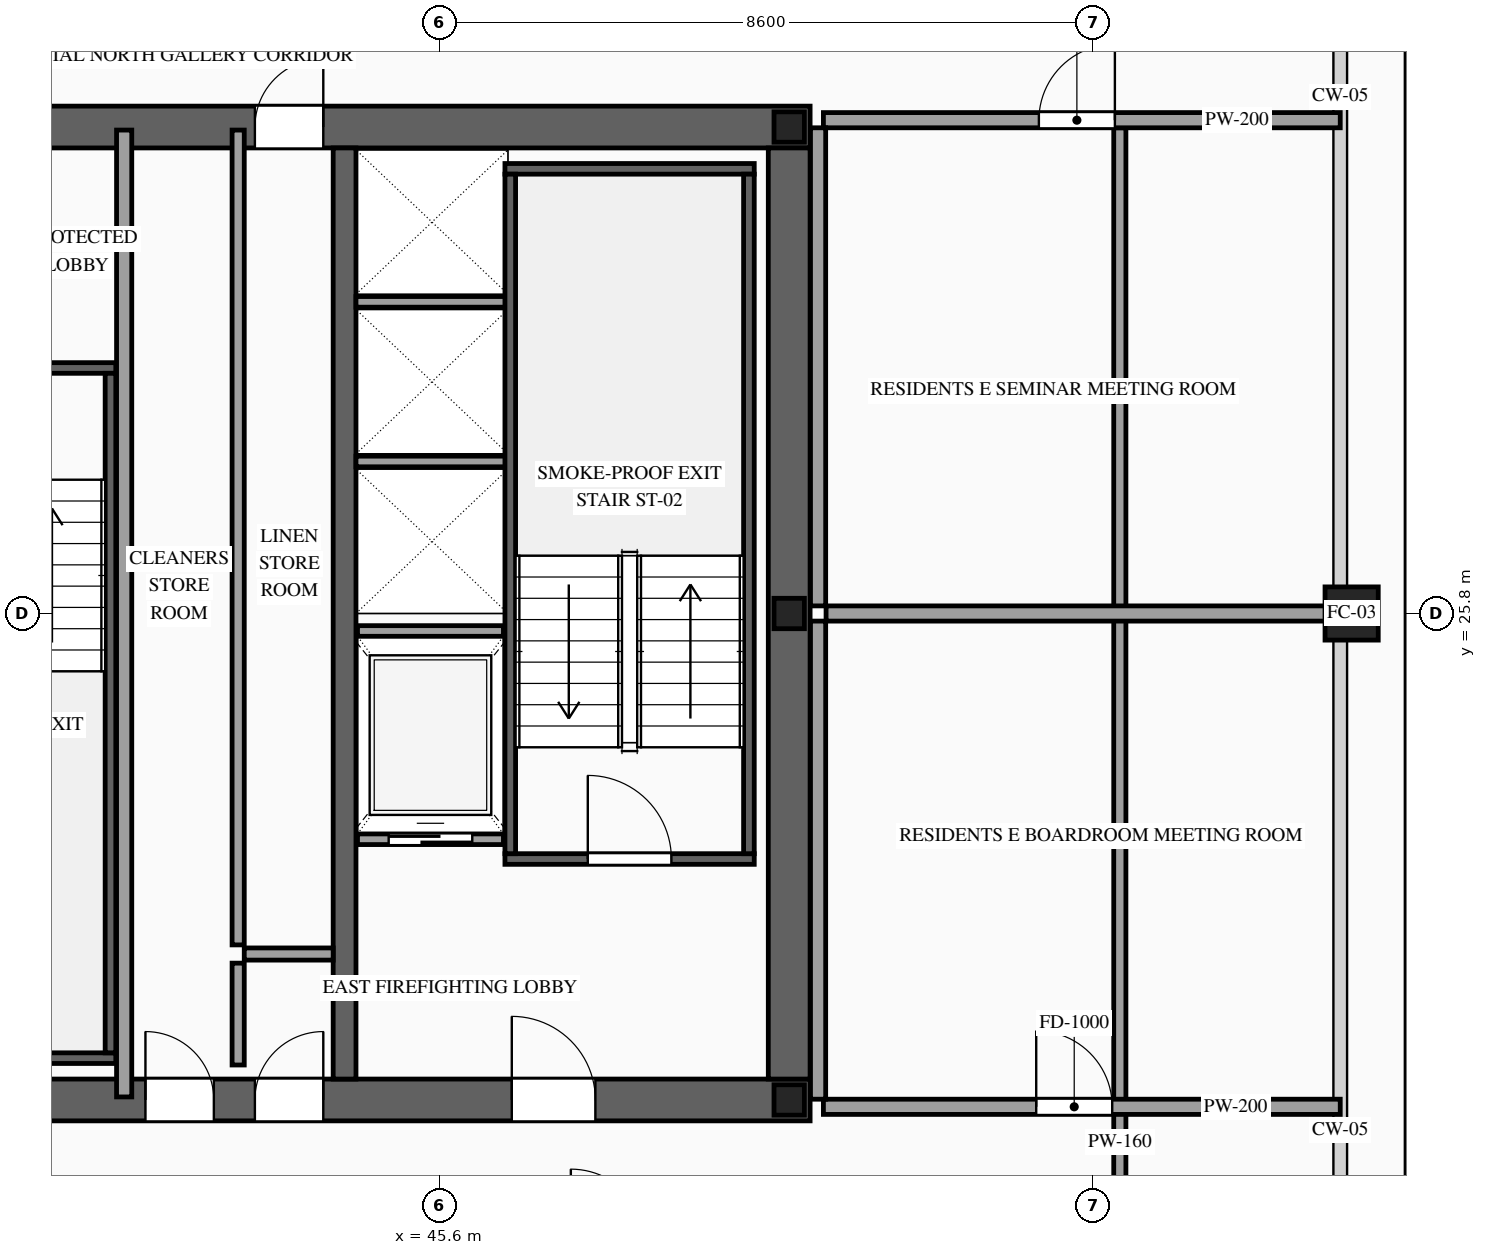
"""IFC4 building model, lengths in metres.
Left out: names, types, materials, properties, quantities, classifications, styles, units other than length and angle.
Written with IfcOpenShell. Run it as: python <this file> out.ifc"""

import sys

from ifc_helpers import new_model, si_unit, direction, frame, frame_2d, origin, origin_2d, place, context, subcontext, project, spatial, rectangle, hollow_rectangle, i_section, extrude, source, transform, mapped, element, fill, save


model = new_model("IFC4")
c1 = context("Model", 3, precision=1e-05, world=origin(), true_north=direction((0.0, 1.0)))
c2 = subcontext(c1, "Body", "Model", "MODEL_VIEW")
j1 = project(units=[si_unit("LENGTHUNIT", "METRE"), si_unit("PLANEANGLEUNIT", "RADIAN")], contexts=[c1])
p1 = place(None, origin())
s1 = spatial("IfcSite", under=j1, at=p1, CompositionType="ELEMENT")
p2 = place(p1, origin())
s2 = spatial("IfcBuilding", under=s1, at=p2, CompositionType="ELEMENT")
p3 = place(p2, frame((0.0, 0.0, 227.6)))
s3 = spatial("IfcBuildingStorey", under=s2, at=p3, CompositionType="ELEMENT", Elevation=227.6)
p4 = place(p3, frame((23.525, 19.4, 0.0), z_axis=(0.0, 0.0, 1.0), x_axis=(1.0, 0.0, 0.0)))
e1 = element("IfcWall", 1, at=p4, inside=s3, PredefinedType="SHEAR", context=c2, shape_type="SweptSolid", body=[
    extrude(rectangle(XDim=26.95, YDim=0.55, at=frame_2d((13.475, 0.0))), origin(), (0.0, 0.0, 1.0), 3.5),
])
p5 = place(p4, frame((1.925, 0.0, 0.0)))
e2 = element("IfcOpeningElement", 2, at=p5, cuts=e1, PredefinedType="OPENING", context=c2, shape_type="SweptSolid", body=[
    extrude(rectangle(XDim=1.1, YDim=2.2, at=frame_2d((0.55, 1.1))), frame((0.0, 0.29, 0.0), z_axis=(0.0, -1.0, 0.0), x_axis=(1.0, 0.0, 0.0)), (0.0, 0.0, 1.0), 0.58),
])
p6 = place(p4, frame((9.825, 0.0, 0.0)))
e3 = element("IfcOpeningElement", 3, at=p6, cuts=e1, PredefinedType="OPENING", context=c2, shape_type="SweptSolid", body=[
    extrude(rectangle(XDim=1.1, YDim=2.2, at=frame_2d((0.55, 1.1))), frame((0.0, 0.29, 0.0), z_axis=(0.0, -1.0, 0.0), x_axis=(1.0, 0.0, 0.0)), (0.0, 0.0, 1.0), 0.58),
])
p7 = place(p4, frame((23.025, 0.0, 0.0)))
e4 = element("IfcOpeningElement", 4, at=p7, cuts=e1, PredefinedType="OPENING", context=c2, shape_type="SweptSolid", body=[
    extrude(rectangle(XDim=1.1, YDim=2.2, at=frame_2d((0.55, 1.1))), frame((0.0, 0.29, 0.0), z_axis=(0.0, -1.0, 0.0), x_axis=(1.0, 0.0, 0.0)), (0.0, 0.0, 1.0), 0.58),
])
p8 = place(p4, frame((19.645, 0.0, 0.0)))
e5 = element("IfcOpeningElement", 5, at=p8, cuts=e1, PredefinedType="OPENING", context=c2, shape_type="SweptSolid", body=[
    extrude(rectangle(XDim=0.9, YDim=2.15, at=frame_2d((0.45, 1.075))), frame((0.0, 0.29, 0.0), z_axis=(0.0, -1.0, 0.0), x_axis=(1.0, 0.0, 0.0)), (0.0, 0.0, 1.0), 0.58),
])
p9 = place(p4, frame((18.205, 0.0, 0.0)))
e6 = element("IfcOpeningElement", 6, at=p9, cuts=e1, PredefinedType="OPENING", context=c2, shape_type="SweptSolid", body=[
    extrude(rectangle(XDim=0.9, YDim=2.15, at=frame_2d((0.45, 1.075))), frame((0.0, 0.29, 0.0), z_axis=(0.0, -1.0, 0.0), x_axis=(1.0, 0.0, 0.0)), (0.0, 0.0, 1.0), 0.58),
])
p10 = place(p3, frame((23.525, 32.2, 0.0), z_axis=(0.0, 0.0, 1.0), x_axis=(1.0, 0.0, 0.0)))
e7 = element("IfcWall", 7, at=p10, inside=s3, PredefinedType="SHEAR", context=c2, shape_type="SweptSolid", body=[
    extrude(rectangle(XDim=26.95, YDim=0.55, at=frame_2d((13.475, 0.0))), origin(), (0.0, 0.0, 1.0), 3.5),
])
p11 = place(p10, frame((4.545, 0.0, 0.0)))
e8 = element("IfcOpeningElement", 8, at=p11, cuts=e7, PredefinedType="OPENING", context=c2, shape_type="SweptSolid", body=[
    extrude(rectangle(XDim=0.9, YDim=2.15, at=frame_2d((0.45, 1.075))), frame((0.0, 0.29, 0.0), z_axis=(0.0, -1.0, 0.0), x_axis=(1.0, 0.0, 0.0)), (0.0, 0.0, 1.0), 0.58),
])
p12 = place(p10, frame((9.825, 0.0, 0.0)))
e9 = element("IfcOpeningElement", 9, at=p12, cuts=e7, PredefinedType="OPENING", context=c2, shape_type="SweptSolid", body=[
    extrude(rectangle(XDim=1.1, YDim=2.2, at=frame_2d((0.55, 1.1))), frame((0.0, 0.29, 0.0), z_axis=(0.0, -1.0, 0.0), x_axis=(1.0, 0.0, 0.0)), (0.0, 0.0, 1.0), 0.58),
])
p13 = place(p10, frame((15.675, 0.0, 0.0)))
e10 = element("IfcOpeningElement", 10, at=p13, cuts=e7, PredefinedType="OPENING", context=c2, shape_type="SweptSolid", body=[
    extrude(rectangle(XDim=1.1, YDim=2.2, at=frame_2d((0.55, 1.1))), frame((0.0, 0.29, 0.0), z_axis=(0.0, -1.0, 0.0), x_axis=(1.0, 0.0, 0.0)), (0.0, 0.0, 1.0), 0.58),
])
p14 = place(p10, frame((19.645, 0.0, 0.0)))
e11 = element("IfcOpeningElement", 11, at=p14, cuts=e7, PredefinedType="OPENING", context=c2, shape_type="SweptSolid", body=[
    extrude(rectangle(XDim=0.9, YDim=2.15, at=frame_2d((0.45, 1.075))), frame((0.0, 0.29, 0.0), z_axis=(0.0, -1.0, 0.0), x_axis=(1.0, 0.0, 0.0)), (0.0, 0.0, 1.0), 0.58),
])
m1 = source(origin(), c2, "Body", "SweptSolid", [
    extrude(rectangle(XDim=12.25, YDim=0.55, at=frame_2d((6.125, 0.0))), origin(), (0.0, 0.0, 1.0), 3.5),
])
p15 = place(p3, frame((50.2, 19.675, 0.0), z_axis=(0.0, 0.0, 1.0), x_axis=(0.0, 1.0, 0.0)))
e12 = element("IfcWall", 12, at=p15, inside=s3, PredefinedType="SHEAR", context=c2, shape_type="MappedRepresentation", body=[
    mapped(m1, transform((0.0, 0.0, 0.0), scale=1.0)),
])
m2 = source(origin(), c2, "Body", "SweptSolid", [
    extrude(rectangle(XDim=12.25, YDim=0.3, at=frame_2d((6.125, 0.0))), origin(), (0.0, 0.0, 1.0), 3.5),
])
p16 = place(p3, frame((44.35, 19.675, 0.0), z_axis=(0.0, 0.0, 1.0), x_axis=(0.0, 1.0, 0.0)))
e13 = element("IfcWall", 13, at=p16, inside=s3, PredefinedType="SOLIDWALL", context=c2, shape_type="MappedRepresentation", body=[
    mapped(m2, transform((0.0, 0.0, 0.0), scale=1.0)),
])
m3 = source(origin(), c2, "Body", "SweptSolid", [
    extrude(i_section(OverallWidth=0.4, OverallDepth=0.4, WebThickness=0.013, FlangeThickness=0.021, at=origin_2d()), origin(), (0.0, 0.0, 1.0), 3.5),
])
for number, where, z_axis, x_axis in (
    (14, (50.2, 19.4, 0.0), (0.0, 0.0, 1.0), (1.0, 0.0, 0.0)),
    (15, (50.2, 25.8, 0.0), (0.0, 0.0, 1.0), (1.0, 0.0, 0.0)),
    (16, (50.2, 32.2, 0.0), (0.0, 0.0, 1.0), (1.0, 0.0, 0.0)),
):
    element("IfcColumn", number, at=place(p3, frame(where, z_axis=z_axis, x_axis=x_axis)), inside=s3, PredefinedType="COLUMN", context=c2, shape_type="MappedRepresentation", body=[
        mapped(m3, transform((0.0, 0.0, 0.0), scale=1.0)),
    ])
m4 = source(origin(), c2, "Body", "SweptSolid", [
    extrude(hollow_rectangle(XDim=0.7, YDim=0.7, WallThickness=0.032, at=origin_2d()), origin(), (0.0, 0.0, 1.0), 3.5),
])
p17 = place(p3, frame((57.6, 25.8, 0.0), z_axis=(0.0, 0.0, 1.0), x_axis=(1.0, 0.0, 0.0)))
e17 = element("IfcColumn", 17, at=p17, inside=s3, PredefinedType="COLUMN", context=c2, shape_type="MappedRepresentation", body=[
    mapped(m4, transform((0.0, 0.0, 0.0), scale=1.0)),
])
p18 = place(p3, frame((44.52, 22.83, 0.0), z_axis=(0.0, 0.0, 1.0), x_axis=(1.0, 0.0, 0.0)))
e18 = element("IfcWall", 18, at=p18, inside=s3, PredefinedType="SOLIDWALL", context=c2, shape_type="SweptSolid", body=[
    extrude(rectangle(XDim=1.92, YDim=0.14, at=frame_2d((0.96, 0.0))), origin(), (0.0, 0.0, 1.0), 3.28),
])
p19 = place(p18, frame((0.41, 0.0, 0.0)))
e19 = element("IfcOpeningElement", 19, at=p19, cuts=e18, PredefinedType="OPENING", context=c2, shape_type="SweptSolid", body=[
    extrude(rectangle(XDim=1.1, YDim=2.2, at=frame_2d((0.55, 1.1))), frame((0.0, 0.085, 0.0), z_axis=(0.0, -1.0, 0.0), x_axis=(1.0, 0.0, 0.0)), (0.0, 0.0, 1.0), 0.17),
])
m5 = source(origin(), c2, "Body", "SweptSolid", [
    extrude(rectangle(XDim=1.92, YDim=0.14, at=frame_2d((0.96, 0.0))), origin(), (0.0, 0.0, 1.0), 3.28),
])
p20 = place(p3, frame((44.52, 25.57, 0.0), z_axis=(0.0, 0.0, 1.0), x_axis=(1.0, 0.0, 0.0)))
e20 = element("IfcWall", 20, at=p20, inside=s3, PredefinedType="SOLIDWALL", context=c2, shape_type="MappedRepresentation", body=[
    mapped(m5, transform((0.0, 0.0, 0.0), scale=1.0)),
])
m6 = source(origin(), c2, "Body", "SweptSolid", [
    extrude(rectangle(XDim=2.0, YDim=0.14, at=frame_2d((1.0, 0.0))), origin(), (0.0, 0.0, 1.0), 3.28),
])
for number, where, z_axis, x_axis in (
    (21, (44.5, 27.8, 0.0), (0.0, 0.0, 1.0), (1.0, 0.0, 0.0)),
    (22, (44.5, 29.9, 0.0), (0.0, 0.0, 1.0), (1.0, 0.0, 0.0)),
):
    element("IfcWall", number, at=place(p3, frame(where, z_axis=z_axis, x_axis=x_axis)), inside=s3, PredefinedType="SOLIDWALL", context=c2, shape_type="MappedRepresentation", body=[
        mapped(m6, transform((0.0, 0.0, 0.0), scale=1.0)),
    ])
p21 = place(p3, frame((46.46, 22.57, 0.0), z_axis=(0.0, 0.0, 1.0), x_axis=(1.0, 0.0, 0.0)))
e23 = element("IfcWall", 23, at=p21, inside=s3, PredefinedType="SOLIDWALL", context=c2, shape_type="SweptSolid", body=[
    extrude(rectangle(XDim=3.28, YDim=0.14, at=frame_2d((1.64, 0.0))), origin(), (0.0, 0.0, 1.0), 3.28),
])
p22 = place(p21, frame((1.09, 0.0, 0.0)))
e24 = element("IfcOpeningElement", 24, at=p22, cuts=e23, PredefinedType="OPENING", context=c2, shape_type="SweptSolid", body=[
    extrude(rectangle(XDim=1.1, YDim=2.2, at=frame_2d((0.55, 1.1))), frame((0.0, 0.085, 0.0), z_axis=(0.0, -1.0, 0.0), x_axis=(1.0, 0.0, 0.0)), (0.0, 0.0, 1.0), 0.17),
])
m7 = source(origin(), c2, "Body", "SweptSolid", [
    extrude(rectangle(XDim=3.28, YDim=0.14, at=frame_2d((1.64, 0.0))), origin(), (0.0, 0.0, 1.0), 3.28),
])
p23 = place(p3, frame((46.46, 31.65, 0.0), z_axis=(0.0, 0.0, 1.0), x_axis=(1.0, 0.0, 0.0)))
e25 = element("IfcWall", 25, at=p23, inside=s3, PredefinedType="SOLIDWALL", context=c2, shape_type="MappedRepresentation", body=[
    mapped(m7, transform((0.0, 0.0, 0.0), scale=1.0)),
])
m8 = source(origin(), c2, "Body", "SweptSolid", [
    extrude(rectangle(XDim=8.94, YDim=0.14, at=frame_2d((4.47, 0.0))), origin(), (0.0, 0.0, 1.0), 3.28),
])
for number, where, z_axis, x_axis in (
    (26, (46.53, 22.64, 0.0), (0.0, 0.0, 1.0), (0.0, 1.0, 0.0)),
    (27, (49.67, 22.64, 0.0), (0.0, 0.0, 1.0), (0.0, 1.0, 0.0)),
):
    element("IfcWall", number, at=place(p3, frame(where, z_axis=z_axis, x_axis=x_axis)), inside=s3, PredefinedType="SOLIDWALL", context=c2, shape_type="MappedRepresentation", body=[
        mapped(m8, transform((0.0, 0.0, 0.0), scale=1.0)),
    ])
p24 = place(p3, frame((38.2, 29.03, 0.0), z_axis=(0.0, 0.0, 1.0), x_axis=(1.0, 0.0, 0.0)))
e28 = element("IfcWall", 28, at=p24, inside=s3, PredefinedType="SOLIDWALL", context=c2, shape_type="SweptSolid", body=[
    extrude(rectangle(XDim=3.14, YDim=0.14, at=frame_2d((1.57, 0.0))), origin(), (0.0, 0.0, 1.0), 3.28),
])
p25 = place(p24, frame((1.02, 0.0, 0.0)))
e29 = element("IfcOpeningElement", 29, at=p25, cuts=e28, PredefinedType="OPENING", context=c2, shape_type="SweptSolid", body=[
    extrude(rectangle(XDim=1.1, YDim=2.2, at=frame_2d((0.55, 1.1))), frame((0.0, 0.085, 0.0), z_axis=(0.0, -1.0, 0.0), x_axis=(1.0, 0.0, 0.0)), (0.0, 0.0, 1.0), 0.17),
])
m9 = source(origin(), c2, "Body", "SweptSolid", [
    extrude(rectangle(XDim=3.14, YDim=0.14, at=frame_2d((1.57, 0.0))), origin(), (0.0, 0.0, 1.0), 3.28),
])
p26 = place(p3, frame((38.2, 19.95, 0.0), z_axis=(0.0, 0.0, 1.0), x_axis=(1.0, 0.0, 0.0)))
e30 = element("IfcWall", 30, at=p26, inside=s3, PredefinedType="SOLIDWALL", context=c2, shape_type="MappedRepresentation", body=[
    mapped(m9, transform((0.0, 0.0, 0.0), scale=1.0)),
])
m10 = source(origin(), c2, "Body", "SweptSolid", [
    extrude(rectangle(XDim=8.94, YDim=0.14, at=frame_2d((4.47, 0.0))), origin(), (0.0, 0.0, 1.0), 3.28),
])
p27 = place(p3, frame((41.27, 20.02, 0.0), z_axis=(0.0, 0.0, 1.0), x_axis=(0.0, 1.0, 0.0)))
e31 = element("IfcWall", 31, at=p27, inside=s3, PredefinedType="SOLIDWALL", context=c2, shape_type="MappedRepresentation", body=[
    mapped(m10, transform((0.0, 0.0, 0.0), scale=1.0)),
])
m11 = source(origin(), c2, "Body", "SweptSolid", [
    extrude(rectangle(XDim=1.34, YDim=0.16, at=frame_2d((0.67, 0.0))), origin(), (0.0, 0.0, 1.0), 3.28),
])
p28 = place(p3, frame((42.95, 19.86, 0.0), z_axis=(0.0, 0.0, 1.0), x_axis=(0.0, 1.0, 0.0)))
e32 = element("IfcWall", 32, at=p28, inside=s3, PredefinedType="PARTITIONING", context=c2, shape_type="MappedRepresentation", body=[
    mapped(m11, transform((0.0, 0.0, 0.0), scale=1.0)),
])
m12 = source(origin(), c2, "Body", "SweptSolid", [
    extrude(rectangle(XDim=1.17, YDim=0.16, at=frame_2d((0.585, 0.0))), origin(), (0.0, 0.0, 1.0), 3.28),
])
p29 = place(p3, frame((43.03, 21.32, 0.0), z_axis=(0.0, 0.0, 1.0), x_axis=(1.0, 0.0, 0.0)))
e33 = element("IfcWall", 33, at=p29, inside=s3, PredefinedType="PARTITIONING", context=c2, shape_type="MappedRepresentation", body=[
    mapped(m12, transform((0.0, 0.0, 0.0), scale=1.0)),
])
m13 = source(origin(), c2, "Body", "SweptSolid", [
    extrude(rectangle(XDim=12.72, YDim=0.2, at=frame_2d((6.36, 0.0))), origin(), (0.0, 0.0, 1.0), 3.28),
])
p30 = place(p3, frame((41.45, 19.44, 0.0), z_axis=(0.0, 0.0, 1.0), x_axis=(0.0, 1.0, 0.0)))
e34 = element("IfcWall", 34, at=p30, inside=s3, PredefinedType="PARTITIONING", context=c2, shape_type="MappedRepresentation", body=[
    mapped(m13, transform((0.0, 0.0, 0.0), scale=1.0)),
])
m14 = source(origin(), c2, "Body", "SweptSolid", [
    extrude(rectangle(XDim=10.72, YDim=0.16, at=frame_2d((5.36, 0.0))), origin(), (0.0, 0.0, 1.0), 3.28),
])
p31 = place(p3, frame((42.95, 21.44, 0.0), z_axis=(0.0, 0.0, 1.0), x_axis=(0.0, 1.0, 0.0)))
e35 = element("IfcWall", 35, at=p31, inside=s3, PredefinedType="PARTITIONING", context=c2, shape_type="MappedRepresentation", body=[
    mapped(m14, transform((0.0, 0.0, 0.0), scale=1.0)),
])
m15 = source(origin(), c2, "Body", "SweptSolid", [
    extrude(rectangle(XDim=26.69, YDim=0.16, at=frame_2d((13.345, 0.0))), origin(), (0.0, 0.0, 1.0), 3.28),
])
p32 = place(p3, frame((54.55, 5.5, 0.0), z_axis=(0.0, 0.0, 1.0), x_axis=(0.0, 1.0, 0.0)))
e36 = element("IfcWall", 36, at=p32, inside=s3, PredefinedType="PARTITIONING", context=c2, shape_type="MappedRepresentation", body=[
    mapped(m15, transform((0.0, 0.0, 0.0), scale=1.0)),
])
p33 = place(p3, frame((50.65, 19.31, 0.0), z_axis=(0.0, 0.0, 1.0), x_axis=(1.0, 0.0, 0.0)))
e37 = element("IfcWall", 37, at=p33, inside=s3, PredefinedType="PARTITIONING", context=c2, shape_type="SweptSolid", body=[
    extrude(rectangle(XDim=6.8, YDim=0.2, at=frame_2d((3.4, 0.0))), origin(), (0.0, 0.0, 1.0), 2.825),
])
p34 = place(p33, frame((2.8, 0.0, 0.0)))
e38 = element("IfcOpeningElement", 38, at=p34, cuts=e37, PredefinedType="OPENING", context=c2, shape_type="SweptSolid", body=[
    extrude(rectangle(XDim=1.0, YDim=2.2, at=frame_2d((0.5, 1.1))), frame((0.0, 0.115, 0.0), z_axis=(0.0, -1.0, 0.0), x_axis=(1.0, 0.0, 0.0)), (0.0, 0.0, 1.0), 0.23),
])
m16 = source(origin(), c2, "Body", "SweptSolid", [
    extrude(rectangle(XDim=6.765, YDim=0.2, at=frame_2d((3.382, 0.0))), origin(), (0.0, 0.0, 1.0), 2.787),
])
p35 = place(p3, frame((50.685, 25.8, 0.0), z_axis=(0.0, 0.0, 1.0), x_axis=(1.0, 0.0, 0.0)))
e39 = element("IfcWall", 39, at=p35, inside=s3, PredefinedType="PARTITIONING", context=c2, shape_type="MappedRepresentation", body=[
    mapped(m16, transform((0.0, 0.0, 0.0), scale=1.0)),
])
m17 = source(origin(), c2, "Body", "SweptSolid", [
    extrude(rectangle(XDim=6.29, YDim=0.2, at=frame_2d((3.145, 0.0))), origin(), (0.0, 0.0, 1.0), 3.28),
])
p36 = place(p3, frame((50.58, 19.41, 0.0), z_axis=(0.0, 0.0, 1.0), x_axis=(0.0, 1.0, 0.0)))
e40 = element("IfcWall", 40, at=p36, inside=s3, PredefinedType="PARTITIONING", context=c2, shape_type="MappedRepresentation", body=[
    mapped(m17, transform((0.0, 0.0, 0.0), scale=1.0)),
])
p37 = place(p3, frame((50.65, 32.29, 0.0), z_axis=(0.0, 0.0, 1.0), x_axis=(1.0, 0.0, 0.0)))
e41 = element("IfcWall", 41, at=p37, inside=s3, PredefinedType="PARTITIONING", context=c2, shape_type="SweptSolid", body=[
    extrude(rectangle(XDim=6.8, YDim=0.2, at=frame_2d((3.4, 0.0))), origin(), (0.0, 0.0, 1.0), 2.825),
])
p38 = place(p37, frame((2.835, 0.0, 0.0)))
e42 = element("IfcOpeningElement", 42, at=p38, cuts=e41, PredefinedType="OPENING", context=c2, shape_type="SweptSolid", body=[
    extrude(rectangle(XDim=1.0, YDim=2.2, at=frame_2d((0.5, 1.1))), frame((0.0, 0.115, 0.0), z_axis=(0.0, -1.0, 0.0), x_axis=(1.0, 0.0, 0.0)), (0.0, 0.0, 1.0), 0.23),
])
p39 = place(p3, frame((50.58, 25.9, 0.0), z_axis=(0.0, 0.0, 1.0), x_axis=(0.0, 1.0, 0.0)))
e43 = element("IfcWall", 43, at=p39, inside=s3, PredefinedType="PARTITIONING", context=c2, shape_type="MappedRepresentation", body=[
    mapped(m17, transform((0.0, 0.0, 0.0), scale=1.0)),
])
m18 = source(origin(), c2, "Body", "SweptSolid", [
    extrude(rectangle(XDim=1.1, YDim=2.2, at=frame_2d((0.55, 1.1))), frame((0.0, 0.025, 0.0), z_axis=(0.0, -1.0, 0.0), x_axis=(1.0, 0.0, 0.0)), (0.0, 0.0, 1.0), 0.05),
])
p40 = place(p19, origin())
e44 = element("IfcDoor", 44, at=p40, inside=s3, OperationType="SLIDING_TO_RIGHT", PredefinedType="DOOR", context=c2, shape_type="MappedRepresentation", body=[
    mapped(m18, transform((0.0, 0.0, 0.0), scale=1.0)),
])
fill(e19, e44)
m19 = source(origin(), c2, "Body", "SweptSolid", [
    extrude(rectangle(XDim=1.1, YDim=2.2, at=frame_2d((0.55, 1.1))), frame((0.0, 0.025, 0.0), z_axis=(0.0, -1.0, 0.0), x_axis=(1.0, 0.0, 0.0)), (0.0, 0.0, 1.0), 0.05),
])
p41 = place(p22, origin())
e45 = element("IfcDoor", 45, at=p41, inside=s3, OperationType="SINGLE_SWING_LEFT", PredefinedType="DOOR", context=c2, shape_type="MappedRepresentation", body=[
    mapped(m19, transform((0.0, 0.0, 0.0), scale=1.0)),
])
fill(e24, e45)
p42 = place(p7, origin())
e46 = element("IfcDoor", 46, at=p42, inside=s3, OperationType="SINGLE_SWING_LEFT", PredefinedType="DOOR", context=c2, shape_type="MappedRepresentation", body=[
    mapped(m19, transform((0.0, 0.0, 0.0), scale=1.0)),
])
fill(e4, e46)
m20 = source(origin(), c2, "Body", "SweptSolid", [
    extrude(rectangle(XDim=0.9, YDim=2.15, at=frame_2d((0.45, 1.075))), frame((0.0, 0.025, 0.0), z_axis=(0.0, -1.0, 0.0), x_axis=(1.0, 0.0, 0.0)), (0.0, 0.0, 1.0), 0.05),
])
p43 = place(p8, origin())
e47 = element("IfcDoor", 47, at=p43, inside=s3, OperationType="SINGLE_SWING_RIGHT", PredefinedType="DOOR", context=c2, shape_type="MappedRepresentation", body=[
    mapped(m20, transform((0.0, 0.0, 0.0), scale=1.0)),
])
fill(e5, e47)
p44 = place(p9, origin())
e48 = element("IfcDoor", 48, at=p44, inside=s3, OperationType="SINGLE_SWING_LEFT", PredefinedType="DOOR", context=c2, shape_type="MappedRepresentation", body=[
    mapped(m20, transform((0.0, 0.0, 0.0), scale=1.0)),
])
fill(e6, e48)
p45 = place(p14, origin())
e49 = element("IfcDoor", 49, at=p45, inside=s3, OperationType="SINGLE_SWING_RIGHT", PredefinedType="DOOR", context=c2, shape_type="MappedRepresentation", body=[
    mapped(m20, transform((0.0, 0.0, 0.0), scale=1.0)),
])
fill(e11, e49)
m21 = source(origin(), c2, "Body", "SweptSolid", [
    extrude(rectangle(XDim=1.0, YDim=2.2, at=frame_2d((0.5, 1.1))), frame((0.0, 0.025, 0.0), z_axis=(0.0, -1.0, 0.0), x_axis=(1.0, 0.0, 0.0)), (0.0, 0.0, 1.0), 0.05),
])
p46 = place(p34, origin())
e50 = element("IfcDoor", 50, at=p46, inside=s3, OperationType="SINGLE_SWING_LEFT", PredefinedType="DOOR", context=c2, shape_type="MappedRepresentation", body=[
    mapped(m21, transform((0.0, 0.0, 0.0), scale=1.0)),
])
fill(e38, e50)
p47 = place(p38, origin())
e51 = element("IfcDoor", 51, at=p47, inside=s3, OperationType="SINGLE_SWING_RIGHT", PredefinedType="DOOR", context=c2, shape_type="MappedRepresentation", body=[
    mapped(m21, transform((0.0, 0.0, 0.0), scale=1.0)),
])
fill(e42, e51)
save(model, sys.argv[1])
